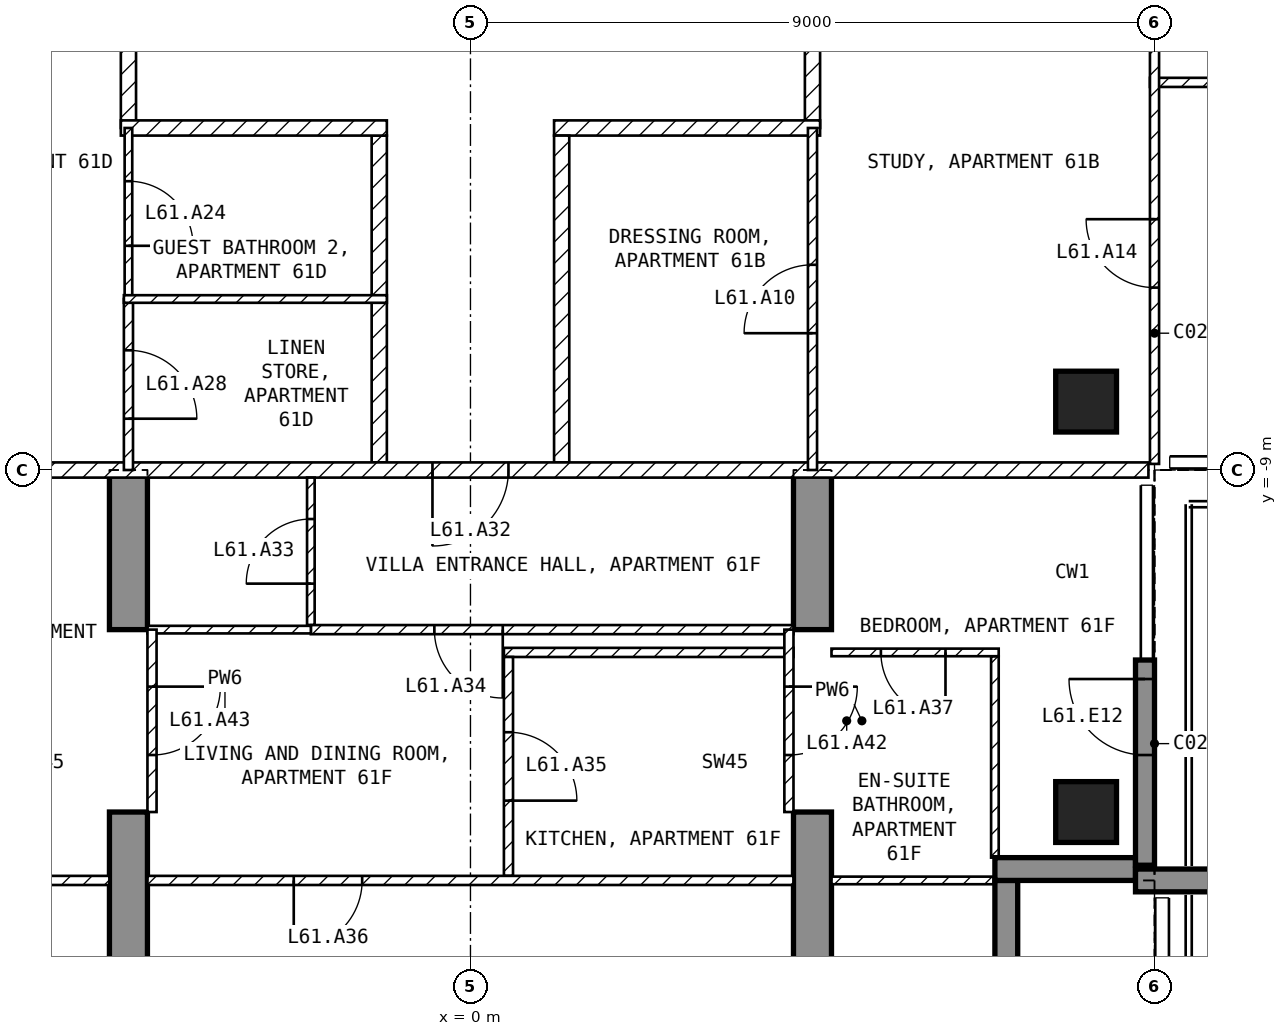
"""IFC4 building model, lengths in metres.
Left out: names, types, materials, properties, quantities, classifications, styles, units other than length and angle.
Written with IfcOpenShell. Run it as: python <this file> out.ifc"""

import sys

from ifc_helpers import new_model, si_unit, direction, frame, frame_2d, origin, origin_2d, place, context, subcontext, project, spatial, polyline, rectangle, outline, extrude, element, fill, save


model = new_model("IFC4")
c1 = context("Model", 3, precision=1e-05, world=origin(), true_north=direction((0.0, 1.0)))
c2 = subcontext(c1, "Body", "Model", "MODEL_VIEW")
j1 = project(units=[si_unit("LENGTHUNIT", "METRE"), si_unit("PLANEANGLEUNIT", "RADIAN")], contexts=[c1])
p1 = place(None, origin())
s1 = spatial("IfcSite", under=j1, at=p1, CompositionType="ELEMENT")
p2 = place(p1, origin())
s2 = spatial("IfcBuilding", under=s1, at=p2, CompositionType="ELEMENT")
p3 = place(p2, frame((0.0, 0.0, 243.0)))
s3 = spatial("IfcBuildingStorey", under=s2, at=p3, CompositionType="ELEMENT", Elevation=243.0)
for number, where, z_axis, x_axis in (
    (1, (8.1, -13.5, -0.25), (0.0, 0.0, 1.0), (1.0, 0.0, 0.0)),
    (2, (8.1, -8.1, -0.25), (0.0, 0.0, 1.0), (1.0, 0.0, 0.0)),
):
    element("IfcColumn", number, at=place(p3, frame(where, z_axis=z_axis, x_axis=x_axis)), inside=s3, PredefinedType="COLUMN", context=c2, shape_type="SweptSolid", body=[
        extrude(rectangle(XDim=0.8, YDim=0.8, at=origin_2d()), origin(), (0.0, 0.0, 1.0), 3.5),
    ])
for number, where, z_axis, x_axis in (
    (3, (-4.75, -16.7, -0.25), (1.0, 0.0, 0.0), (0.0, 1.0, 0.0)),
    (4, (4.25, -16.7, -0.25), (1.0, 0.0, 0.0), (0.0, 1.0, 0.0)),
):
    element("IfcWall", number, at=place(p3, frame(where, z_axis=z_axis, x_axis=x_axis)), inside=s3, PredefinedType="SHEAR", context=c2, shape_type="SweptSolid", body=[
        extrude(outline(polyline([(0.0, 0.0), (3.2, 0.0), (3.2, 2.65), (5.6, 2.65), (5.6, 0.0), (7.7, 0.0), (7.7, 3.5), (0.0, 3.5), (0.0, 0.0)])), origin(), (0.0, 0.0, 1.0), 0.5),
    ])
p4 = place(p3, frame((8.875, -14.2, 0.0), z_axis=(0.0, 0.0, 1.0), x_axis=(0.0, 1.0, 0.0)))
e5 = element("IfcWall", 5, at=p4, inside=s3, PredefinedType="SOLIDWALL", context=c2, shape_type="SweptSolid", body=[
    extrude(rectangle(XDim=2.7, YDim=0.25, at=frame_2d((1.35, 0.0))), origin(), (0.0, 0.0, 1.0), 3.25),
])
p5 = place(p4, frame((1.45, 0.0, 0.0)))
e6 = element("IfcOpeningElement", 6, at=p5, cuts=e5, PredefinedType="OPENING", context=c2, shape_type="SweptSolid", body=[
    extrude(rectangle(XDim=1.0, YDim=2.4, at=frame_2d((0.5, 1.2))), frame((0.0, 0.135, 0.0), z_axis=(0.0, -1.0, 0.0), x_axis=(1.0, 0.0, 0.0)), (0.0, 0.0, 1.0), 0.27),
])
p6 = place(p3, frame((7.05, -16.2, 0.0), z_axis=(0.0, 0.0, 1.0), x_axis=(0.0, 1.0, 0.0)))
e7 = element("IfcWall", 7, at=p6, inside=s3, PredefinedType="SOLIDWALL", context=c2, shape_type="SweptSolid", body=[
    extrude(rectangle(XDim=1.8, YDim=0.3, at=frame_2d((0.9, 0.0))), origin(), (0.0, 0.0, 1.0), 3.25),
])
p7 = place(p3, frame((6.9, -14.25, 0.0), z_axis=(0.0, 0.0, 1.0), x_axis=(1.0, 0.0, 0.0)))
e8 = element("IfcWall", 8, at=p7, inside=s3, PredefinedType="SOLIDWALL", context=c2, shape_type="SweptSolid", body=[
    extrude(rectangle(XDim=1.85, YDim=0.3, at=frame_2d((0.925, 0.0))), origin(), (0.0, 0.0, 1.0), 3.25),
])
p8 = place(p3, frame((8.75, -14.4, 0.0), z_axis=(0.0, 0.0, 1.0), x_axis=(1.0, 0.0, 0.0)))
e9 = element("IfcWall", 9, at=p8, inside=s3, PredefinedType="SOLIDWALL", context=c2, shape_type="SweptSolid", body=[
    extrude(rectangle(XDim=2.95, YDim=0.3, at=frame_2d((1.475, 0.0))), origin(), (0.0, 0.0, 1.0), 3.25),
])
p9 = place(p3, frame((4.5, -1.3, 0.0), z_axis=(0.0, 0.0, 1.0), x_axis=(0.0, -1.0, 0.0)))
e10 = element("IfcWall", 10, at=p9, inside=s3, PredefinedType="PARTITIONING", context=c2, shape_type="SweptSolid", body=[
    extrude(rectangle(XDim=3.2, YDim=0.2, at=frame_2d((1.6, 0.0))), origin(), (0.0, 0.0, 1.0), 3.25),
])
p10 = place(p3, frame((4.6, -4.5, 0.0), z_axis=(0.0, 0.0, 1.0), x_axis=(-1.0, 0.0, 0.0)))
e11 = element("IfcWall", 11, at=p10, inside=s3, PredefinedType="PARTITIONING", context=c2, shape_type="SweptSolid", body=[
    extrude(rectangle(XDim=3.5, YDim=0.2, at=frame_2d((1.75, 0.0))), origin(), (0.0, 0.0, 1.0), 3.25),
])
p11 = place(p3, frame((1.2, -4.6, 0.0), z_axis=(0.0, 0.0, 1.0), x_axis=(0.0, -1.0, 0.0)))
e12 = element("IfcWall", 12, at=p11, inside=s3, PredefinedType="PARTITIONING", context=c2, shape_type="SweptSolid", body=[
    extrude(rectangle(XDim=4.3, YDim=0.2, at=frame_2d((2.15, 0.0))), origin(), (0.0, 0.0, 1.0), 3.25),
])
p12 = place(p3, frame((-4.5, -4.5, 0.0), z_axis=(0.0, 0.0, 1.0), x_axis=(0.0, 1.0, 0.0)))
e13 = element("IfcWall", 13, at=p12, inside=s3, PredefinedType="PARTITIONING", context=c2, shape_type="SweptSolid", body=[
    extrude(rectangle(XDim=3.2, YDim=0.2, at=frame_2d((1.6, 0.0))), origin(), (0.0, 0.0, 1.0), 3.25),
])
p13 = place(p3, frame((-1.2, -8.9, 0.0), z_axis=(0.0, 0.0, 1.0), x_axis=(0.0, 1.0, 0.0)))
e14 = element("IfcWall", 14, at=p13, inside=s3, PredefinedType="PARTITIONING", context=c2, shape_type="SweptSolid", body=[
    extrude(rectangle(XDim=4.3, YDim=0.2, at=frame_2d((2.15, 0.0))), origin(), (0.0, 0.0, 1.0), 3.25),
])
p14 = place(p3, frame((-1.1, -4.5, 0.0), z_axis=(0.0, 0.0, 1.0), x_axis=(-1.0, 0.0, 0.0)))
e15 = element("IfcWall", 15, at=p14, inside=s3, PredefinedType="PARTITIONING", context=c2, shape_type="SweptSolid", body=[
    extrude(rectangle(XDim=3.5, YDim=0.2, at=frame_2d((1.75, 0.0))), origin(), (0.0, 0.0, 1.0), 3.25),
])
p15 = place(p3, frame((8.92, -9.0, 0.0), z_axis=(0.0, 0.0, 1.0), x_axis=(-1.0, 0.0, 0.0)))
e16 = element("IfcWall", 16, at=p15, inside=s3, PredefinedType="PARTITIONING", context=c2, shape_type="SweptSolid", body=[
    extrude(rectangle(XDim=17.84, YDim=0.2, at=frame_2d((8.92, 0.0))), origin(), (0.0, 0.0, 1.0), 3.25),
])
p16 = place(p15, frame((8.42, 0.0, 0.0)))
e17 = element("IfcOpeningElement", 17, at=p16, cuts=e16, PredefinedType="OPENING", context=c2, shape_type="SweptSolid", body=[
    extrude(rectangle(XDim=1.0, YDim=2.1, at=frame_2d((0.5, 1.05))), frame((0.0, 0.11, 0.0), z_axis=(0.0, -1.0, 0.0), x_axis=(1.0, 0.0, 0.0)), (0.0, 0.0, 1.0), 0.22),
])
p17 = place(p3, frame((16.8, -3.9, 0.0), z_axis=(0.0, 0.0, 1.0), x_axis=(-1.0, 0.0, 0.0)))
e18 = element("IfcWall", 18, at=p17, inside=s3, PredefinedType="PARTITIONING", context=c2, shape_type="SweptSolid", body=[
    extrude(rectangle(XDim=7.86, YDim=0.12, at=frame_2d((3.93, 0.0))), origin(), (0.0, 0.0, 1.0), 3.25),
])
p18 = place(p17, frame((3.15, 0.0, 0.0)))
e19 = element("IfcOpeningElement", 19, at=p18, cuts=e18, PredefinedType="OPENING", context=c2, shape_type="SweptSolid", body=[
    extrude(rectangle(XDim=0.9, YDim=2.1, at=frame_2d((0.45, 1.05))), frame((0.0, 0.07, 0.0), z_axis=(0.0, -1.0, 0.0), x_axis=(1.0, 0.0, 0.0)), (0.0, 0.0, 1.0), 0.14),
])
p19 = place(p3, frame((9.0, -8.92, 0.0), z_axis=(0.0, 0.0, 1.0), x_axis=(0.0, 1.0, 0.0)))
e20 = element("IfcWall", 20, at=p19, inside=s3, PredefinedType="PARTITIONING", context=c2, shape_type="SweptSolid", body=[
    extrude(rectangle(XDim=7.62, YDim=0.12, at=frame_2d((3.81, 0.0))), origin(), (0.0, 0.0, 1.0), 3.25),
])
p20 = place(p19, frame((2.32, 0.0, 0.0)))
e21 = element("IfcOpeningElement", 21, at=p20, cuts=e20, PredefinedType="OPENING", context=c2, shape_type="SweptSolid", body=[
    extrude(rectangle(XDim=0.9, YDim=2.1, at=frame_2d((0.45, 1.05))), frame((0.0, 0.07, 0.0), z_axis=(0.0, -1.0, 0.0), x_axis=(1.0, 0.0, 0.0)), (0.0, 0.0, 1.0), 0.14),
])
p21 = place(p3, frame((4.5, -9.0, 0.0), z_axis=(0.0, 0.0, 1.0), x_axis=(0.0, 1.0, 0.0)))
e22 = element("IfcWall", 22, at=p21, inside=s3, PredefinedType="PARTITIONING", context=c2, shape_type="SweptSolid", body=[
    extrude(rectangle(XDim=4.5, YDim=0.12, at=frame_2d((2.25, 0.0))), origin(), (0.0, 0.0, 1.0), 3.25),
])
p22 = place(p21, frame((1.8, 0.0, 0.0)))
e23 = element("IfcOpeningElement", 23, at=p22, cuts=e22, PredefinedType="OPENING", context=c2, shape_type="SweptSolid", body=[
    extrude(rectangle(XDim=0.9, YDim=2.1, at=frame_2d((0.45, 1.05))), frame((0.0, 0.07, 0.0), z_axis=(0.0, -1.0, 0.0), x_axis=(1.0, 0.0, 0.0)), (0.0, 0.0, 1.0), 0.14),
])
p23 = place(p3, frame((-4.5, -4.5, 0.0), z_axis=(0.0, 0.0, 1.0), x_axis=(0.0, -1.0, 0.0)))
e24 = element("IfcWall", 24, at=p23, inside=s3, PredefinedType="PARTITIONING", context=c2, shape_type="SweptSolid", body=[
    extrude(rectangle(XDim=2.25, YDim=0.1, at=frame_2d((1.125, 0.0))), origin(), (0.0, 0.0, 1.0), 3.25),
])
p24 = place(p23, frame((0.7, 0.0, 0.0)))
e25 = element("IfcOpeningElement", 25, at=p24, cuts=e24, PredefinedType="OPENING", context=c2, shape_type="SweptSolid", body=[
    extrude(rectangle(XDim=0.85, YDim=2.1, at=frame_2d((0.425, 1.05))), frame((0.0, 0.06, 0.0), z_axis=(0.0, -1.0, 0.0), x_axis=(1.0, 0.0, 0.0)), (0.0, 0.0, 1.0), 0.12),
])
p25 = place(p3, frame((-4.5, -6.75, 0.0), z_axis=(0.0, 0.0, 1.0), x_axis=(0.0, -1.0, 0.0)))
e26 = element("IfcWall", 26, at=p25, inside=s3, PredefinedType="PARTITIONING", context=c2, shape_type="SweptSolid", body=[
    extrude(rectangle(XDim=2.25, YDim=0.12, at=frame_2d((1.125, 0.0))), origin(), (0.0, 0.0, 1.0), 3.25),
])
p26 = place(p25, frame((0.675, 0.0, 0.0)))
e27 = element("IfcOpeningElement", 27, at=p26, cuts=e26, PredefinedType="OPENING", context=c2, shape_type="SweptSolid", body=[
    extrude(rectangle(XDim=0.9, YDim=2.1, at=frame_2d((0.45, 1.05))), frame((0.0, 0.07, 0.0), z_axis=(0.0, -1.0, 0.0), x_axis=(1.0, 0.0, 0.0)), (0.0, 0.0, 1.0), 0.14),
])
p27 = place(p3, frame((-1.1, -6.75, 0.0), z_axis=(0.0, 0.0, 1.0), x_axis=(-1.0, 0.0, 0.0)))
e28 = element("IfcWall", 28, at=p27, inside=s3, PredefinedType="PARTITIONING", context=c2, shape_type="SweptSolid", body=[
    extrude(rectangle(XDim=3.46, YDim=0.1, at=frame_2d((1.73, 0.0))), origin(), (0.0, 0.0, 1.0), 3.25),
])
p28 = place(p3, frame((-2.1, -11.04, 0.0), z_axis=(0.0, 0.0, 1.0), x_axis=(0.0, 1.0, 0.0)))
e29 = element("IfcWall", 29, at=p28, inside=s3, PredefinedType="PARTITIONING", context=c2, shape_type="SweptSolid", body=[
    extrude(rectangle(XDim=1.94, YDim=0.1, at=frame_2d((0.97, 0.0))), origin(), (0.0, 0.0, 1.0), 3.25),
])
p29 = place(p28, frame((0.545, 0.0, 0.0)))
e30 = element("IfcOpeningElement", 30, at=p29, cuts=e29, PredefinedType="OPENING", context=c2, shape_type="SweptSolid", body=[
    extrude(rectangle(XDim=0.85, YDim=2.1, at=frame_2d((0.425, 1.05))), frame((0.0, 0.06, 0.0), z_axis=(0.0, -1.0, 0.0), x_axis=(1.0, 0.0, 0.0)), (0.0, 0.0, 1.0), 0.12),
])
p30 = place(p3, frame((4.25, -11.1, 0.0), z_axis=(0.0, 0.0, 1.0), x_axis=(-1.0, 0.0, 0.0)))
e31 = element("IfcWall", 31, at=p30, inside=s3, PredefinedType="PARTITIONING", context=c2, shape_type="SweptSolid", body=[
    extrude(rectangle(XDim=6.35, YDim=0.12, at=frame_2d((3.175, 0.0))), origin(), (0.0, 0.0, 1.0), 3.25),
])
p31 = place(p30, frame((3.825, 0.0, 0.0)))
e32 = element("IfcOpeningElement", 32, at=p31, cuts=e31, PredefinedType="OPENING", context=c2, shape_type="SweptSolid", body=[
    extrude(rectangle(XDim=0.9, YDim=2.1, at=frame_2d((0.45, 1.05))), frame((0.0, 0.07, 0.0), z_axis=(0.0, -1.0, 0.0), x_axis=(1.0, 0.0, 0.0)), (0.0, 0.0, 1.0), 0.14),
])
p32 = place(p3, frame((-2.1, -11.1, 0.0), z_axis=(0.0, 0.0, 1.0), x_axis=(-1.0, 0.0, 0.0)))
e33 = element("IfcWall", 33, at=p32, inside=s3, PredefinedType="PARTITIONING", context=c2, shape_type="SweptSolid", body=[
    extrude(rectangle(XDim=2.15, YDim=0.1, at=frame_2d((1.075, 0.0))), origin(), (0.0, 0.0, 1.0), 3.25),
])
p33 = place(p3, frame((4.25, -11.4, 0.0), z_axis=(0.0, 0.0, 1.0), x_axis=(-1.0, 0.0, 0.0)))
e34 = element("IfcWall", 34, at=p33, inside=s3, PredefinedType="PARTITIONING", context=c2, shape_type="SweptSolid", body=[
    extrude(rectangle(XDim=3.81, YDim=0.12, at=frame_2d((1.905, 0.0))), origin(), (0.0, 0.0, 1.0), 3.25),
])
p34 = place(p3, frame((0.5, -11.46, 0.0), z_axis=(0.0, 0.0, 1.0), x_axis=(0.0, -1.0, 0.0)))
e35 = element("IfcWall", 35, at=p34, inside=s3, PredefinedType="PARTITIONING", context=c2, shape_type="SweptSolid", body=[
    extrude(rectangle(XDim=2.88, YDim=0.12, at=frame_2d((1.44, 0.0))), origin(), (0.0, 0.0, 1.0), 3.25),
])
p35 = place(p34, frame((0.99, 0.0, 0.0)))
e36 = element("IfcOpeningElement", 36, at=p35, cuts=e35, PredefinedType="OPENING", context=c2, shape_type="SweptSolid", body=[
    extrude(rectangle(XDim=0.9, YDim=2.1, at=frame_2d((0.45, 1.05))), frame((0.0, 0.07, 0.0), z_axis=(0.0, -1.0, 0.0), x_axis=(1.0, 0.0, 0.0)), (0.0, 0.0, 1.0), 0.14),
])
p36 = place(p3, frame((4.25, -14.4, 0.0), z_axis=(0.0, 0.0, 1.0), x_axis=(-1.0, 0.0, 0.0)))
e37 = element("IfcWall", 37, at=p36, inside=s3, PredefinedType="PARTITIONING", context=c2, shape_type="SweptSolid", body=[
    extrude(rectangle(XDim=8.5, YDim=0.12, at=frame_2d((4.25, 0.0))), origin(), (0.0, 0.0, 1.0), 3.25),
])
p37 = place(p36, frame((5.675, 0.0, 0.0)))
e38 = element("IfcOpeningElement", 38, at=p37, cuts=e37, PredefinedType="OPENING", context=c2, shape_type="SweptSolid", body=[
    extrude(rectangle(XDim=0.9, YDim=2.1, at=frame_2d((0.45, 1.05))), frame((0.0, 0.07, 0.0), z_axis=(0.0, -1.0, 0.0), x_axis=(1.0, 0.0, 0.0)), (0.0, 0.0, 1.0), 0.14),
])
p38 = place(p3, frame((6.9, -14.1, 0.0), z_axis=(0.0, 0.0, 1.0), x_axis=(0.0, 1.0, 0.0)))
e39 = element("IfcWall", 39, at=p38, inside=s3, PredefinedType="PARTITIONING", context=c2, shape_type="SweptSolid", body=[
    extrude(rectangle(XDim=2.65, YDim=0.1, at=frame_2d((1.325, 0.0))), origin(), (0.0, 0.0, 1.0), 3.25),
])
p39 = place(p3, frame((6.95, -11.4, 0.0), z_axis=(0.0, 0.0, 1.0), x_axis=(-1.0, 0.0, 0.0)))
e40 = element("IfcWall", 40, at=p39, inside=s3, PredefinedType="PARTITIONING", context=c2, shape_type="SweptSolid", body=[
    extrude(rectangle(XDim=2.2, YDim=0.1, at=frame_2d((1.1, 0.0))), origin(), (0.0, 0.0, 1.0), 3.25),
])
p40 = place(p39, frame((0.7, 0.0, 0.0)))
e41 = element("IfcOpeningElement", 41, at=p40, cuts=e40, PredefinedType="OPENING", context=c2, shape_type="SweptSolid", body=[
    extrude(rectangle(XDim=0.85, YDim=2.1, at=frame_2d((0.425, 1.05))), frame((0.0, 0.06, 0.0), z_axis=(0.0, -1.0, 0.0), x_axis=(1.0, 0.0, 0.0)), (0.0, 0.0, 1.0), 0.12),
])
p41 = place(p3, frame((7.12, -14.4, 0.0), z_axis=(0.0, 0.0, 1.0), x_axis=(-1.0, 0.0, 0.0)))
e42 = element("IfcWall", 42, at=p41, inside=s3, PredefinedType="PARTITIONING", context=c2, shape_type="SweptSolid", body=[
    extrude(rectangle(XDim=2.37, YDim=0.1, at=frame_2d((1.185, 0.0))), origin(), (0.0, 0.0, 1.0), 3.25),
])
p42 = place(p3, frame((-4.75, -14.4, 0.0), z_axis=(0.0, 0.0, 1.0), x_axis=(-1.0, 0.0, 0.0)))
e43 = element("IfcWall", 43, at=p42, inside=s3, PredefinedType="PARTITIONING", context=c2, shape_type="SweptSolid", body=[
    extrude(rectangle(XDim=2.37, YDim=0.12, at=frame_2d((1.185, 0.0))), origin(), (0.0, 0.0, 1.0), 3.25),
])
p43 = place(p3, frame((4.19, -11.1, 0.0), z_axis=(0.0, 0.0, 1.0), x_axis=(0.0, -1.0, 0.0)))
e44 = element("IfcWall", 44, at=p43, inside=s3, PredefinedType="PARTITIONING", context=c2, shape_type="SweptSolid", body=[
    extrude(rectangle(XDim=2.4, YDim=0.12, at=frame_2d((1.2, 0.0))), origin(), (0.0, 0.0, 1.0), 2.4),
])
p44 = place(p43, frame((0.75, 0.0, 0.0)))
e45 = element("IfcOpeningElement", 45, at=p44, cuts=e44, PredefinedType="OPENING", context=c2, shape_type="SweptSolid", body=[
    extrude(rectangle(XDim=0.9, YDim=2.1, at=frame_2d((0.45, 1.05))), frame((0.0, 0.07, 0.0), z_axis=(0.0, -1.0, 0.0), x_axis=(1.0, 0.0, 0.0)), (0.0, 0.0, 1.0), 0.14),
])
p45 = place(p3, frame((-4.19, -11.1, 0.0), z_axis=(0.0, 0.0, 1.0), x_axis=(0.0, -1.0, 0.0)))
e46 = element("IfcWall", 46, at=p45, inside=s3, PredefinedType="PARTITIONING", context=c2, shape_type="SweptSolid", body=[
    extrude(rectangle(XDim=2.4, YDim=0.12, at=frame_2d((1.2, 0.0))), origin(), (0.0, 0.0, 1.0), 2.4),
])
p46 = place(p45, frame((0.75, 0.0, 0.0)))
e47 = element("IfcOpeningElement", 47, at=p46, cuts=e46, PredefinedType="OPENING", context=c2, shape_type="SweptSolid", body=[
    extrude(rectangle(XDim=0.9, YDim=2.1, at=frame_2d((0.45, 1.05))), frame((0.0, 0.07, 0.0), z_axis=(0.0, -1.0, 0.0), x_axis=(1.0, 0.0, 0.0)), (0.0, 0.0, 1.0), 0.14),
])
p47 = place(p5, origin())
e48 = element("IfcDoor", 48, at=p47, inside=s3, OperationType="SINGLE_SWING_RIGHT", PredefinedType="DOOR", context=c2, shape_type="SweptSolid", body=[
    extrude(rectangle(XDim=1.0, YDim=2.4, at=frame_2d((0.5, 1.2))), frame((0.0, 0.025, 0.0), z_axis=(0.0, -1.0, 0.0), x_axis=(1.0, 0.0, 0.0)), (0.0, 0.0, 1.0), 0.05),
])
fill(e6, e48)
p48 = place(p22, origin())
e49 = element("IfcDoor", 49, at=p48, inside=s3, OperationType="SINGLE_SWING_LEFT", PredefinedType="DOOR", context=c2, shape_type="SweptSolid", body=[
    extrude(rectangle(XDim=0.9, YDim=2.1, at=frame_2d((0.45, 1.05))), frame((0.0, 0.025, 0.0), z_axis=(0.0, -1.0, 0.0), x_axis=(1.0, 0.0, 0.0)), (0.0, 0.0, 1.0), 0.05),
])
fill(e23, e49)
p49 = place(p20, origin())
e50 = element("IfcDoor", 50, at=p49, inside=s3, OperationType="SINGLE_SWING_RIGHT", PredefinedType="DOOR", context=c2, shape_type="SweptSolid", body=[
    extrude(rectangle(XDim=0.9, YDim=2.1, at=frame_2d((0.45, 1.05))), frame((0.0, 0.025, 0.0), z_axis=(0.0, -1.0, 0.0), x_axis=(1.0, 0.0, 0.0)), (0.0, 0.0, 1.0), 0.05),
])
fill(e21, e50)
p50 = place(p24, origin())
e51 = element("IfcDoor", 51, at=p50, inside=s3, OperationType="SINGLE_SWING_RIGHT", PredefinedType="DOOR", context=c2, shape_type="SweptSolid", body=[
    extrude(rectangle(XDim=0.85, YDim=2.1, at=frame_2d((0.425, 1.05))), frame((0.0, 0.025, 0.0), z_axis=(0.0, -1.0, 0.0), x_axis=(1.0, 0.0, 0.0)), (0.0, 0.0, 1.0), 0.05),
])
fill(e25, e51)
p51 = place(p26, origin())
e52 = element("IfcDoor", 52, at=p51, inside=s3, OperationType="SINGLE_SWING_RIGHT", PredefinedType="DOOR", context=c2, shape_type="SweptSolid", body=[
    extrude(rectangle(XDim=0.9, YDim=2.1, at=frame_2d((0.45, 1.05))), frame((0.0, 0.025, 0.0), z_axis=(0.0, -1.0, 0.0), x_axis=(1.0, 0.0, 0.0)), (0.0, 0.0, 1.0), 0.05),
])
fill(e27, e52)
p52 = place(p16, origin())
e53 = element("IfcDoor", 53, at=p52, inside=s3, OperationType="SINGLE_SWING_RIGHT", PredefinedType="DOOR", context=c2, shape_type="SweptSolid", body=[
    extrude(rectangle(XDim=1.0, YDim=2.1, at=frame_2d((0.5, 1.05))), frame((0.0, 0.025, 0.0), z_axis=(0.0, -1.0, 0.0), x_axis=(1.0, 0.0, 0.0)), (0.0, 0.0, 1.0), 0.05),
])
fill(e17, e53)
p53 = place(p29, origin())
e54 = element("IfcDoor", 54, at=p53, inside=s3, OperationType="SINGLE_SWING_LEFT", PredefinedType="DOOR", context=c2, shape_type="SweptSolid", body=[
    extrude(rectangle(XDim=0.85, YDim=2.1, at=frame_2d((0.425, 1.05))), frame((0.0, 0.025, 0.0), z_axis=(0.0, -1.0, 0.0), x_axis=(1.0, 0.0, 0.0)), (0.0, 0.0, 1.0), 0.05),
])
fill(e30, e54)
p54 = place(p31, origin())
e55 = element("IfcDoor", 55, at=p54, inside=s3, OperationType="SINGLE_SWING_LEFT", PredefinedType="DOOR", context=c2, shape_type="SweptSolid", body=[
    extrude(rectangle(XDim=0.9, YDim=2.1, at=frame_2d((0.45, 1.05))), frame((0.0, 0.025, 0.0), z_axis=(0.0, -1.0, 0.0), x_axis=(1.0, 0.0, 0.0)), (0.0, 0.0, 1.0), 0.05),
])
fill(e32, e55)
p55 = place(p35, origin())
e56 = element("IfcDoor", 56, at=p55, inside=s3, OperationType="SINGLE_SWING_RIGHT", PredefinedType="DOOR", context=c2, shape_type="SweptSolid", body=[
    extrude(rectangle(XDim=0.9, YDim=2.1, at=frame_2d((0.45, 1.05))), frame((0.0, 0.025, 0.0), z_axis=(0.0, -1.0, 0.0), x_axis=(1.0, 0.0, 0.0)), (0.0, 0.0, 1.0), 0.05),
])
fill(e36, e56)
p56 = place(p37, origin())
e57 = element("IfcDoor", 57, at=p56, inside=s3, OperationType="SINGLE_SWING_RIGHT", PredefinedType="DOOR", context=c2, shape_type="SweptSolid", body=[
    extrude(rectangle(XDim=0.9, YDim=2.1, at=frame_2d((0.45, 1.05))), frame((0.0, 0.025, 0.0), z_axis=(0.0, -1.0, 0.0), x_axis=(1.0, 0.0, 0.0)), (0.0, 0.0, 1.0), 0.05),
])
fill(e38, e57)
p57 = place(p40, origin())
e58 = element("IfcDoor", 58, at=p57, inside=s3, OperationType="SINGLE_SWING_LEFT", PredefinedType="DOOR", context=c2, shape_type="SweptSolid", body=[
    extrude(rectangle(XDim=0.85, YDim=2.1, at=frame_2d((0.425, 1.05))), frame((0.0, 0.025, 0.0), z_axis=(0.0, -1.0, 0.0), x_axis=(1.0, 0.0, 0.0)), (0.0, 0.0, 1.0), 0.05),
])
fill(e41, e58)
p58 = place(p44, origin())
e59 = element("IfcDoor", 59, at=p58, inside=s3, OperationType="SINGLE_SWING_LEFT", PredefinedType="DOOR", context=c2, shape_type="SweptSolid", body=[
    extrude(rectangle(XDim=0.9, YDim=2.1, at=frame_2d((0.45, 1.05))), frame((0.0, 0.025, 0.0), z_axis=(0.0, -1.0, 0.0), x_axis=(1.0, 0.0, 0.0)), (0.0, 0.0, 1.0), 0.05),
])
fill(e45, e59)
p59 = place(p46, origin())
e60 = element("IfcDoor", 60, at=p59, inside=s3, OperationType="SINGLE_SWING_LEFT", PredefinedType="DOOR", context=c2, shape_type="SweptSolid", body=[
    extrude(rectangle(XDim=0.9, YDim=2.1, at=frame_2d((0.45, 1.05))), frame((0.0, 0.025, 0.0), z_axis=(0.0, -1.0, 0.0), x_axis=(1.0, 0.0, 0.0)), (0.0, 0.0, 1.0), 0.05),
])
fill(e47, e60)
save(model, sys.argv[1])
